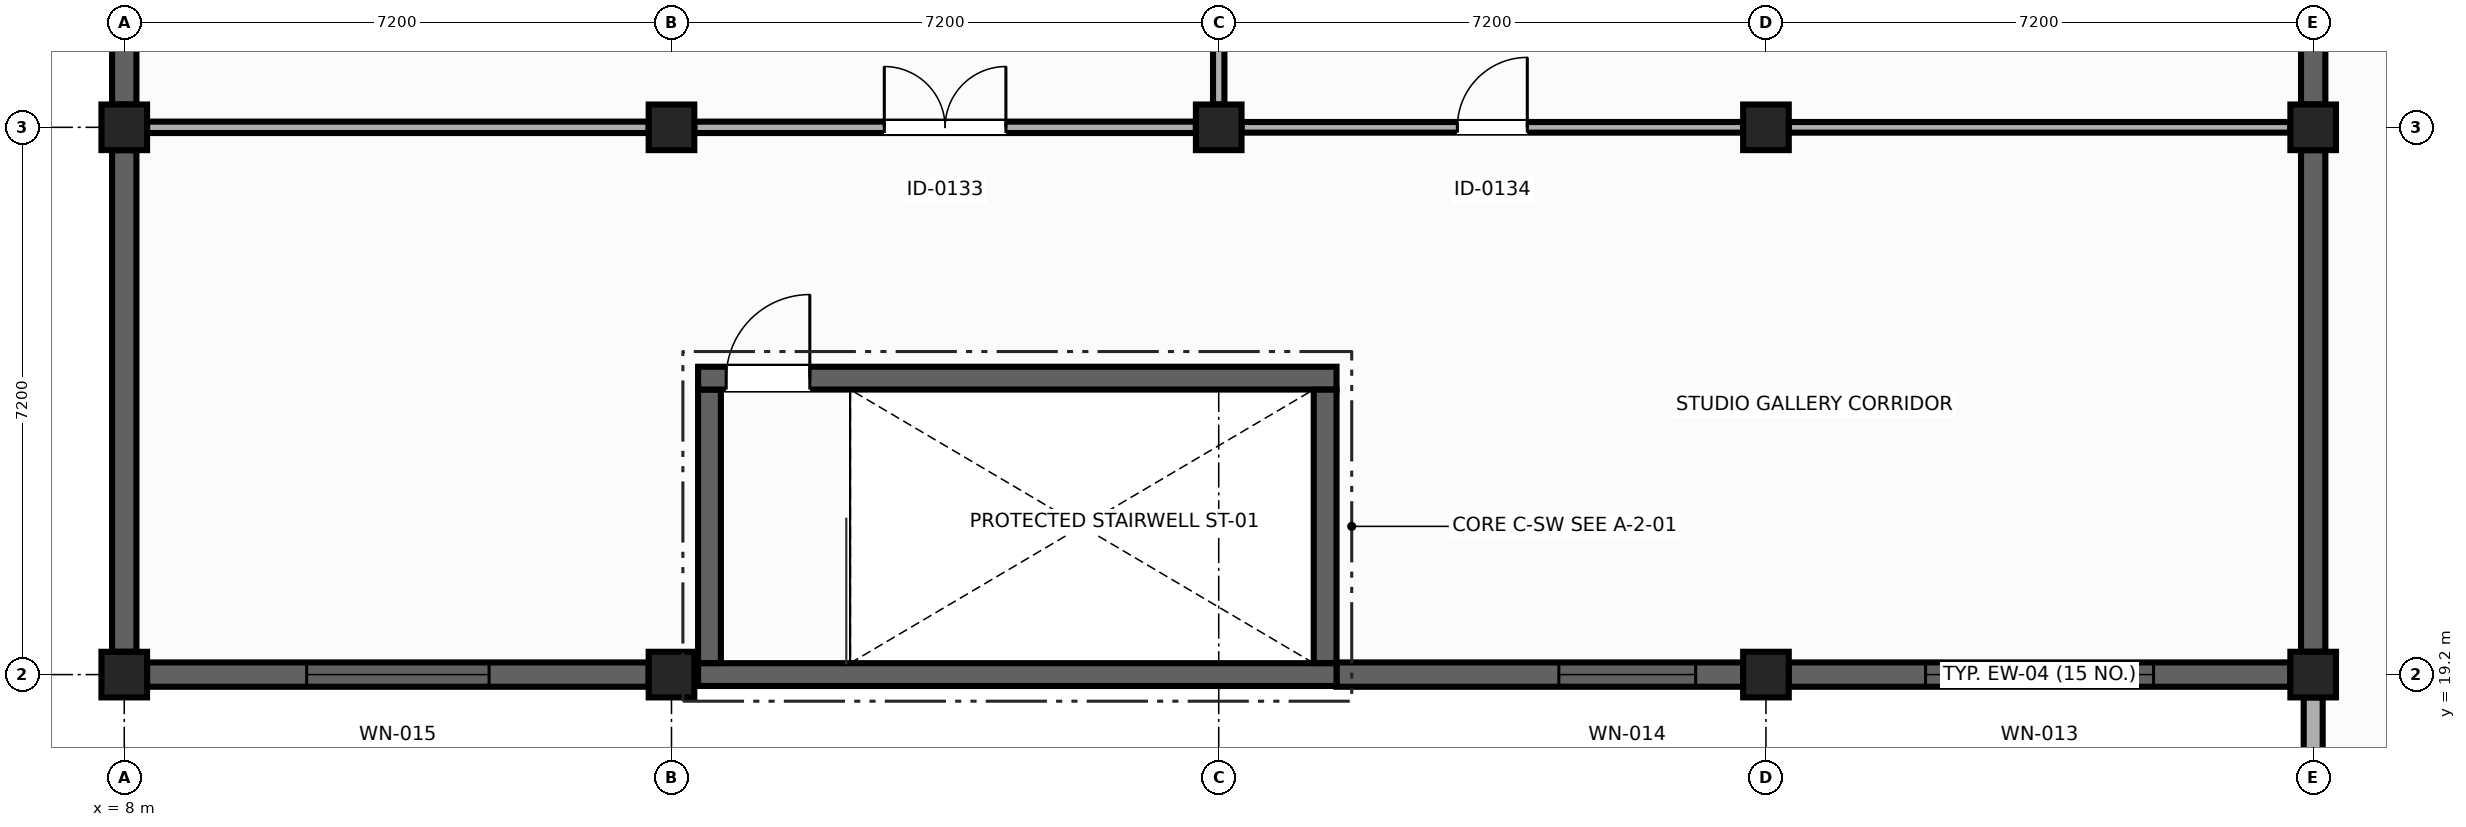
"""IFC4 building model, lengths in metres.
Left out: names, types, materials, properties, quantities, classifications, styles, units other than length and angle.
Written with IfcOpenShell. Run it as: python <this file> out.ifc"""

import sys

from ifc_helpers import new_model, si_unit, direction, frame, frame_2d, origin, origin_2d, place, context, subcontext, project, spatial, rectangle, extrude, element, fill, save


model = new_model("IFC4")
c1 = context("Model", 3, precision=1e-05, world=origin(), true_north=direction((0.0, 1.0)))
c2 = subcontext(c1, "Body", "Model", "MODEL_VIEW")
j1 = project(units=[si_unit("LENGTHUNIT", "METRE"), si_unit("PLANEANGLEUNIT", "RADIAN")], contexts=[c1])
p1 = place(None, origin())
s1 = spatial("IfcSite", under=j1, at=p1, CompositionType="ELEMENT")
p2 = place(p1, origin())
s2 = spatial("IfcBuilding", under=s1, at=p2, CompositionType="ELEMENT")
p3 = place(p2, frame((0.0, 0.0, 9.9)))
s3 = spatial("IfcBuildingStorey", under=s2, at=p3, CompositionType="ELEMENT", Elevation=9.9)
p4 = place(p3, frame((8.0, 19.2, 0.0), z_axis=(0.0, 0.0, 1.0), x_axis=(0.0, 1.0, 0.0)))
e1 = element("IfcColumn", 1, at=p4, inside=s3, PredefinedType="COLUMN", context=c2, shape_type="SweptSolid", body=[
    extrude(rectangle(XDim=0.6, YDim=0.6, at=origin_2d()), origin(), (0.0, 0.0, 1.0), 4.313),
])
for number, where, z_axis, x_axis in (
    (2, (15.2, 19.2, 0.0), (0.0, 0.0, 1.0), (1.0, 0.0, 0.0)),
    (3, (29.6, 19.2, 0.0), (0.0, 0.0, 1.0), (1.0, 0.0, 0.0)),
):
    element("IfcColumn", number, at=place(p3, frame(where, z_axis=z_axis, x_axis=x_axis)), inside=s3, PredefinedType="COLUMN", context=c2, shape_type="SweptSolid", body=[
        extrude(rectangle(XDim=0.6, YDim=0.6, at=origin_2d()), origin(), (0.0, 0.0, 1.0), 6.213),
    ])
p5 = place(p3, frame((36.8, 19.2, 0.0), z_axis=(0.0, 0.0, 1.0), x_axis=(1.0, 0.0, 0.0)))
e4 = element("IfcColumn", 4, at=p5, inside=s3, PredefinedType="COLUMN", context=c2, shape_type="SweptSolid", body=[
    extrude(rectangle(XDim=0.6, YDim=0.6, at=origin_2d()), origin(), (0.0, 0.0, 1.0), 4.5),
])
p6 = place(p3, frame((8.0, 26.4, 0.0), z_axis=(0.0, 0.0, 1.0), x_axis=(1.0, 0.0, 0.0)))
e5 = element("IfcColumn", 5, at=p6, inside=s3, PredefinedType="COLUMN", context=c2, shape_type="SweptSolid", body=[
    extrude(rectangle(XDim=0.6, YDim=0.6, at=origin_2d()), origin(), (0.0, 0.0, 1.0), 4.313),
])
p7 = place(p3, frame((15.2, 26.4, 0.0), z_axis=(0.0, 0.0, 1.0), x_axis=(0.0, 1.0, 0.0)))
e6 = element("IfcColumn", 6, at=p7, inside=s3, PredefinedType="COLUMN", context=c2, shape_type="SweptSolid", body=[
    extrude(rectangle(XDim=0.6, YDim=0.6, at=origin_2d()), origin(), (0.0, 0.0, 1.0), 6.213),
])
p8 = place(p3, frame((22.4, 26.4, 0.0), z_axis=(0.0, 0.0, 1.0), x_axis=(1.0, 0.0, 0.0)))
e7 = element("IfcColumn", 7, at=p8, inside=s3, PredefinedType="COLUMN", context=c2, shape_type="SweptSolid", body=[
    extrude(rectangle(XDim=0.6, YDim=0.6, at=origin_2d()), origin(), (0.0, 0.0, 1.0), 8.113),
])
p9 = place(p3, frame((29.6, 26.4, 0.0), z_axis=(0.0, 0.0, 1.0), x_axis=(1.0, 0.0, 0.0)))
e8 = element("IfcColumn", 8, at=p9, inside=s3, PredefinedType="COLUMN", context=c2, shape_type="SweptSolid", body=[
    extrude(rectangle(XDim=0.6, YDim=0.6, at=origin_2d()), origin(), (0.0, 0.0, 1.0), 6.213),
])
p10 = place(p3, frame((36.8, 26.4, 0.0), z_axis=(0.0, 0.0, 1.0), x_axis=(0.0, 1.0, 0.0)))
e9 = element("IfcColumn", 9, at=p10, inside=s3, PredefinedType="COLUMN", context=c2, shape_type="SweptSolid", body=[
    extrude(rectangle(XDim=0.6, YDim=0.6, at=origin_2d()), origin(), (0.0, 0.0, 1.0), 4.5),
])
p11 = place(p3, frame((36.5, 19.2, 0.0), z_axis=(0.0, 0.0, 1.0), x_axis=(-1.0, 0.0, 0.0)))
e10 = element("IfcWall", 10, at=p11, inside=s3, PredefinedType="SOLIDWALL", context=c2, shape_type="SweptSolid", body=[
    extrude(rectangle(XDim=6.6, YDim=0.32, at=frame_2d((3.3, 0.0))), origin(), (0.0, 0.0, 1.0), 4.5),
])
p12 = place(p11, frame((1.8, 0.0, 0.9)))
e11 = element("IfcOpeningElement", 11, at=p12, cuts=e10, PredefinedType="OPENING", context=c2, shape_type="SweptSolid", body=[
    extrude(rectangle(XDim=3.0, YDim=2.1, at=frame_2d((1.5, 1.05))), frame((0.0, 0.17, 0.0), z_axis=(0.0, -1.0, 0.0), x_axis=(1.0, 0.0, 0.0)), (0.0, 0.0, 1.0), 0.34),
])
p13 = place(p3, frame((29.3, 19.2, 0.0), z_axis=(0.0, 0.0, 1.0), x_axis=(-1.0, 0.0, 0.0)))
e12 = element("IfcWall", 12, at=p13, inside=s3, PredefinedType="SOLIDWALL", context=c2, shape_type="SweptSolid", body=[
    extrude(rectangle(XDim=5.35, YDim=0.32, at=frame_2d((2.675, 0.0))), origin(), (0.0, 0.0, 1.0), 4.5),
])
p14 = place(p13, frame((0.625, 0.0, 1.8)))
e13 = element("IfcOpeningElement", 13, at=p14, cuts=e12, PredefinedType="OPENING", context=c2, shape_type="SweptSolid", body=[
    extrude(rectangle(XDim=1.8, YDim=1.2, at=frame_2d((0.9, 0.6))), frame((0.0, 0.17, 0.0), z_axis=(0.0, -1.0, 0.0), x_axis=(1.0, 0.0, 0.0)), (0.0, 0.0, 1.0), 0.34),
])
p15 = place(p3, frame((14.9, 19.2, 0.0), z_axis=(0.0, 0.0, 1.0), x_axis=(-1.0, 0.0, 0.0)))
e14 = element("IfcWall", 14, at=p15, inside=s3, PredefinedType="SOLIDWALL", context=c2, shape_type="SweptSolid", body=[
    extrude(rectangle(XDim=6.6, YDim=0.32, at=frame_2d((3.3, 0.0))), origin(), (0.0, 0.0, 1.0), 4.5),
])
p16 = place(p15, frame((2.1, 0.0, 1.8)))
e15 = element("IfcOpeningElement", 15, at=p16, cuts=e14, PredefinedType="OPENING", context=c2, shape_type="SweptSolid", body=[
    extrude(rectangle(XDim=2.4, YDim=1.2, at=frame_2d((1.2, 0.6))), frame((0.0, 0.17, 0.0), z_axis=(0.0, -1.0, 0.0), x_axis=(1.0, 0.0, 0.0)), (0.0, 0.0, 1.0), 0.34),
])
for number, where, z_axis, x_axis in (
    (16, (8.0, 19.5, 0.0), (0.0, 0.0, 1.0), (0.0, 1.0, 0.0)),
    (17, (8.0, 26.7, 0.0), (0.0, 0.0, 1.0), (0.0, 1.0, 0.0)),
):
    element("IfcWall", number, at=place(p3, frame(where, z_axis=z_axis, x_axis=x_axis)), inside=s3, PredefinedType="SOLIDWALL", context=c2, shape_type="SweptSolid", body=[
        extrude(rectangle(XDim=6.6, YDim=0.32, at=frame_2d((3.3, 0.0))), origin(), (0.0, 0.0, 1.0), 4.313),
    ])
for number, where, z_axis, x_axis in (
    (18, (36.8, 33.3, 0.0), (0.0, 0.0, 1.0), (0.0, -1.0, 0.0)),
    (19, (36.8, 26.1, 0.0), (0.0, 0.0, 1.0), (0.0, -1.0, 0.0)),
):
    element("IfcWall", number, at=place(p3, frame(where, z_axis=z_axis, x_axis=x_axis)), inside=s3, PredefinedType="SOLIDWALL", context=c2, shape_type="SweptSolid", body=[
        extrude(rectangle(XDim=6.6, YDim=0.32, at=frame_2d((3.3, 0.0))), origin(), (0.0, 0.0, 1.0), 4.22),
    ])
p17 = place(p3, frame((36.8, 17.25, 0.0), z_axis=(0.0, 0.0, 1.0), x_axis=(0.0, 1.0, 0.0)))
e20 = element("IfcWall", 20, at=p17, inside=s3, PredefinedType="SOLIDWALL", context=c2, shape_type="SweptSolid", body=[
    extrude(rectangle(XDim=1.65, YDim=0.25, at=frame_2d((0.825, 0.0))), origin(), (0.0, 0.0, 1.0), 3.375),
])
p18 = place(p3, frame((23.95, 19.2, 0.0), z_axis=(0.0, 0.0, 1.0), x_axis=(-1.0, 0.0, 0.0)))
e21 = element("IfcWall", 21, at=p18, inside=s3, PredefinedType="SHEAR", context=c2, shape_type="SweptSolid", body=[
    extrude(rectangle(XDim=8.4, YDim=0.3, at=frame_2d((4.2, 0.0))), origin(), (0.0, 0.0, 1.0), 7.414),
])
p19 = place(p3, frame((15.7, 19.352, 0.0), z_axis=(0.0, 0.0, 1.0), x_axis=(0.0, 1.0, 0.0)))
e22 = element("IfcWall", 22, at=p19, inside=s3, PredefinedType="SHEAR", context=c2, shape_type="SweptSolid", body=[
    extrude(rectangle(XDim=3.598, YDim=0.3, at=frame_2d((1.799, 0.0))), origin(), (0.0, 0.0, 1.0), 6.345),
])
p20 = place(p3, frame((15.55, 23.1, 0.0), z_axis=(0.0, 0.0, 1.0), x_axis=(1.0, 0.0, 0.0)))
e23 = element("IfcWall", 23, at=p20, inside=s3, PredefinedType="SHEAR", context=c2, shape_type="SweptSolid", body=[
    extrude(rectangle(XDim=8.4, YDim=0.3, at=frame_2d((4.2, 0.0))), origin(), (0.0, 0.0, 1.0), 7.414),
])
p21 = place(p20, frame((0.37, 0.0, 0.0)))
e24 = element("IfcOpeningElement", 24, at=p21, cuts=e23, PredefinedType="OPENING", context=c2, shape_type="SweptSolid", body=[
    extrude(rectangle(XDim=1.1, YDim=2.15, at=frame_2d((0.55, 1.075))), frame((0.0, 0.16, 0.0), z_axis=(0.0, -1.0, 0.0), x_axis=(1.0, 0.0, 0.0)), (0.0, 0.0, 1.0), 0.32),
])
p22 = place(p3, frame((23.8, 22.948, 0.0), z_axis=(0.0, 0.0, 1.0), x_axis=(0.0, -1.0, 0.0)))
e25 = element("IfcWall", 25, at=p22, inside=s3, PredefinedType="SHEAR", context=c2, shape_type="SweptSolid", body=[
    extrude(rectangle(XDim=3.596, YDim=0.3, at=frame_2d((1.798, 0.0))), origin(), (0.0, 0.0, 1.0), 7.744),
])
p23 = place(p3, frame((22.4, 26.7, 0.0), z_axis=(0.0, 0.0, 1.0), x_axis=(0.0, 1.0, 0.0)))
e26 = element("IfcWall", 26, at=p23, inside=s3, PredefinedType="PARTITIONING", context=c2, shape_type="SweptSolid", body=[
    extrude(rectangle(XDim=6.9, YDim=0.15, at=frame_2d((3.45, 0.0))), origin(), (0.0, 0.0, 1.0), 7.551),
])
p24 = place(p23, frame((2.05, 0.0, 1.1)))
e27 = element("IfcOpeningElement", 27, at=p24, cuts=e26, PredefinedType="OPENING", context=c2, shape_type="SweptSolid", body=[
    extrude(rectangle(XDim=2.8, YDim=1.1, at=frame_2d((1.4, 0.55))), frame((0.0, 0.085, 0.0), z_axis=(0.0, -1.0, 0.0), x_axis=(1.0, 0.0, 0.0)), (0.0, 0.0, 1.0), 0.17),
])
p25 = place(p3, frame((8.3, 26.4, 0.0), z_axis=(0.0, 0.0, 1.0), x_axis=(1.0, 0.0, 0.0)))
e28 = element("IfcWall", 28, at=p25, inside=s3, PredefinedType="PARTITIONING", context=c2, shape_type="SweptSolid", body=[
    extrude(rectangle(XDim=6.6, YDim=0.15, at=frame_2d((3.3, 0.0))), origin(), (0.0, 0.0, 1.0), 5.263),
])
p26 = place(p3, frame((15.5, 26.4, 0.0), z_axis=(0.0, 0.0, 1.0), x_axis=(1.0, 0.0, 0.0)))
e29 = element("IfcWall", 29, at=p26, inside=s3, PredefinedType="PARTITIONING", context=c2, shape_type="SweptSolid", body=[
    extrude(rectangle(XDim=6.6, YDim=0.15, at=frame_2d((3.3, 0.0))), origin(), (0.0, 0.0, 1.0), 7.163),
])
p27 = place(p26, frame((2.5, 0.0, 0.0)))
e30 = element("IfcOpeningElement", 30, at=p27, cuts=e29, PredefinedType="OPENING", context=c2, shape_type="SweptSolid", body=[
    extrude(rectangle(XDim=1.6, YDim=2.25, at=frame_2d((0.8, 1.125))), frame((0.0, 0.085, 0.0), z_axis=(0.0, -1.0, 0.0), x_axis=(1.0, 0.0, 0.0)), (0.0, 0.0, 1.0), 0.17),
])
p28 = place(p3, frame((22.7, 26.4, 0.0), z_axis=(0.0, 0.0, 1.0), x_axis=(1.0, 0.0, 0.0)))
e31 = element("IfcWall", 31, at=p28, inside=s3, PredefinedType="PARTITIONING", context=c2, shape_type="SweptSolid", body=[
    extrude(rectangle(XDim=6.6, YDim=0.14, at=frame_2d((3.3, 0.0))), origin(), (0.0, 0.0, 1.0), 7.163),
])
p29 = place(p28, frame((2.84, 0.0, 0.0)))
e32 = element("IfcOpeningElement", 32, at=p29, cuts=e31, PredefinedType="OPENING", context=c2, shape_type="SweptSolid", body=[
    extrude(rectangle(XDim=0.92, YDim=2.1, at=frame_2d((0.46, 1.05))), frame((0.0, 0.08, 0.0), z_axis=(0.0, -1.0, 0.0), x_axis=(1.0, 0.0, 0.0)), (0.0, 0.0, 1.0), 0.16),
])
p30 = place(p3, frame((29.9, 26.4, 0.0), z_axis=(0.0, 0.0, 1.0), x_axis=(1.0, 0.0, 0.0)))
e33 = element("IfcWall", 33, at=p30, inside=s3, PredefinedType="PARTITIONING", context=c2, shape_type="SweptSolid", body=[
    extrude(rectangle(XDim=6.6, YDim=0.14, at=frame_2d((3.3, 0.0))), origin(), (0.0, 0.0, 1.0), 5.263),
])
p31 = place(p12, origin())
e34 = element("IfcWindow", 34, at=p31, inside=s3, PartitioningType="SINGLE_PANEL", PredefinedType="WINDOW", context=c2, shape_type="SweptSolid", body=[
    extrude(rectangle(XDim=3.0, YDim=2.1, at=frame_2d((1.5, 1.05))), frame((0.0, 0.03, 0.0), z_axis=(0.0, -1.0, 0.0), x_axis=(1.0, 0.0, 0.0)), (0.0, 0.0, 1.0), 0.06),
])
fill(e11, e34)
p32 = place(p14, origin())
e35 = element("IfcWindow", 35, at=p32, inside=s3, PartitioningType="SINGLE_PANEL", PredefinedType="WINDOW", context=c2, shape_type="SweptSolid", body=[
    extrude(rectangle(XDim=1.8, YDim=1.2, at=frame_2d((0.9, 0.6))), frame((0.0, 0.03, 0.0), z_axis=(0.0, -1.0, 0.0), x_axis=(1.0, 0.0, 0.0)), (0.0, 0.0, 1.0), 0.06),
])
fill(e13, e35)
p33 = place(p16, origin())
e36 = element("IfcWindow", 36, at=p33, inside=s3, PartitioningType="SINGLE_PANEL", PredefinedType="WINDOW", context=c2, shape_type="SweptSolid", body=[
    extrude(rectangle(XDim=2.4, YDim=1.2, at=frame_2d((1.2, 0.6))), frame((0.0, 0.03, 0.0), z_axis=(0.0, -1.0, 0.0), x_axis=(1.0, 0.0, 0.0)), (0.0, 0.0, 1.0), 0.06),
])
fill(e15, e36)
p34 = place(p21, origin())
e37 = element("IfcDoor", 37, at=p34, inside=s3, OperationType="SINGLE_SWING_RIGHT", PredefinedType="DOOR", context=c2, shape_type="SweptSolid", body=[
    extrude(rectangle(XDim=1.1, YDim=2.15, at=frame_2d((0.55, 1.075))), frame((0.0, 0.025, 0.0), z_axis=(0.0, -1.0, 0.0), x_axis=(1.0, 0.0, 0.0)), (0.0, 0.0, 1.0), 0.05),
])
fill(e24, e37)
p35 = place(p27, origin())
e38 = element("IfcDoor", 38, at=p35, inside=s3, OperationType="DOUBLE_DOOR_SINGLE_SWING", PredefinedType="DOOR", context=c2, shape_type="SweptSolid", body=[
    extrude(rectangle(XDim=1.6, YDim=2.25, at=frame_2d((0.8, 1.125))), frame((0.0, 0.025, 0.0), z_axis=(0.0, -1.0, 0.0), x_axis=(1.0, 0.0, 0.0)), (0.0, 0.0, 1.0), 0.05),
])
fill(e30, e38)
p36 = place(p29, origin())
e39 = element("IfcDoor", 39, at=p36, inside=s3, OperationType="SINGLE_SWING_RIGHT", PredefinedType="DOOR", context=c2, shape_type="SweptSolid", body=[
    extrude(rectangle(XDim=0.92, YDim=2.1, at=frame_2d((0.46, 1.05))), frame((0.0, 0.025, 0.0), z_axis=(0.0, -1.0, 0.0), x_axis=(1.0, 0.0, 0.0)), (0.0, 0.0, 1.0), 0.05),
])
fill(e32, e39)
save(model, sys.argv[1])
